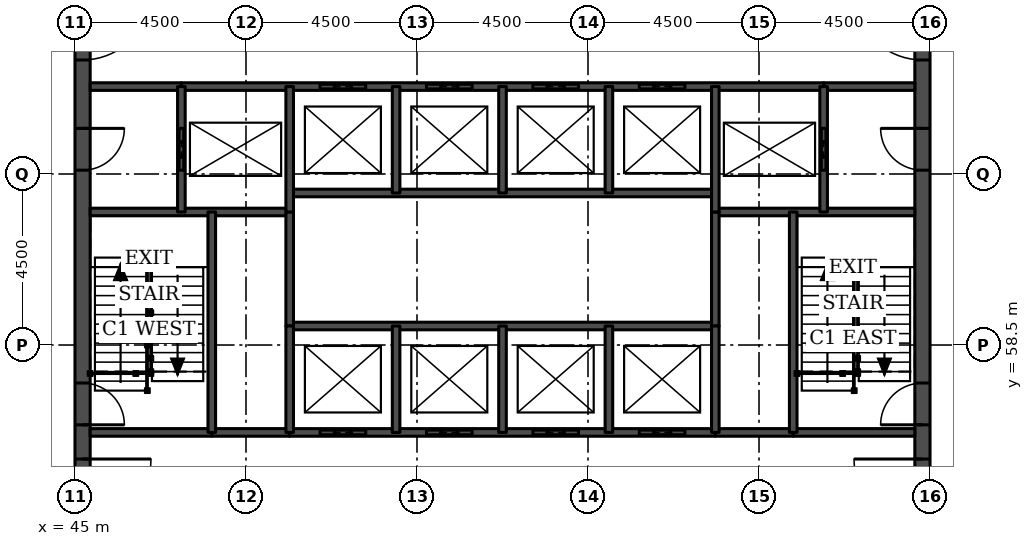
"""IFC4 building model, lengths in metres.
Left out: names, types, materials, properties, quantities, classifications, styles, units other than length and angle.
Written with IfcOpenShell. Run it as: python <this file> out.ifc"""

import sys

from ifc_helpers import new_model, si_unit, direction, frame, frame_2d, origin, place, context, subcontext, project, spatial, rectangle, extrude, element, fill, save


model = new_model("IFC4")
c1 = context("Model", 3, precision=1e-05, world=origin(), true_north=direction((0.0, 1.0)))
c2 = subcontext(c1, "Body", "Model", "MODEL_VIEW")
j1 = project(units=[si_unit("LENGTHUNIT", "METRE"), si_unit("PLANEANGLEUNIT", "RADIAN")], contexts=[c1])
p1 = place(None, origin())
s1 = spatial("IfcSite", under=j1, at=p1, CompositionType="ELEMENT")
p2 = place(p1, origin())
s2 = spatial("IfcBuilding", under=s1, at=p2, CompositionType="ELEMENT")
p3 = place(p2, frame((0.0, 0.0, 162.5)))
s3 = spatial("IfcBuildingStorey", under=s2, at=p3, CompositionType="ELEMENT", Elevation=162.5)
p4 = place(p3, frame((45.2, 49.5, 0.0), z_axis=(0.0, 0.0, 1.0), x_axis=(0.0, 1.0, 0.0)))
e1 = element("IfcWall", 1, at=p4, inside=s3, PredefinedType="SHEAR", context=c2, shape_type="SweptSolid", body=[
    extrude(rectangle(XDim=22.5, YDim=0.4, at=frame_2d((11.25, 0.0))), origin(), (0.0, 0.0, 1.0), 3.7),
])
p5 = place(p4, frame((4.2, 0.0, 0.0)))
e2 = element("IfcOpeningElement", 2, at=p5, cuts=e1, PredefinedType="OPENING", context=c2, shape_type="SweptSolid", body=[
    extrude(rectangle(XDim=1.8, YDim=2.1, at=frame_2d((0.9, 1.05))), frame((0.0, 0.21, 0.0), z_axis=(0.0, -1.0, 0.0), x_axis=(1.0, 0.0, 0.0)), (0.0, 0.0, 1.0), 0.42),
])
p6 = place(p4, frame((6.9, 0.0, 0.0)))
e3 = element("IfcOpeningElement", 3, at=p6, cuts=e1, PredefinedType="OPENING", context=c2, shape_type="SweptSolid", body=[
    extrude(rectangle(XDim=1.1, YDim=2.1, at=frame_2d((0.55, 1.05))), frame((0.0, 0.21, 0.0), z_axis=(0.0, -1.0, 0.0), x_axis=(1.0, 0.0, 0.0)), (0.0, 0.0, 1.0), 0.42),
])
p7 = place(p4, frame((13.6, 0.0, 0.0)))
e4 = element("IfcOpeningElement", 4, at=p7, cuts=e1, PredefinedType="OPENING", context=c2, shape_type="SweptSolid", body=[
    extrude(rectangle(XDim=1.1, YDim=2.1, at=frame_2d((0.55, 1.05))), frame((0.0, 0.21, 0.0), z_axis=(0.0, -1.0, 0.0), x_axis=(1.0, 0.0, 0.0)), (0.0, 0.0, 1.0), 0.42),
])
p8 = place(p4, frame((16.5, 0.0, 0.0)))
e5 = element("IfcOpeningElement", 5, at=p8, cuts=e1, PredefinedType="OPENING", context=c2, shape_type="SweptSolid", body=[
    extrude(rectangle(XDim=1.8, YDim=2.1, at=frame_2d((0.9, 1.05))), frame((0.0, 0.21, 0.0), z_axis=(0.0, -1.0, 0.0), x_axis=(1.0, 0.0, 0.0)), (0.0, 0.0, 1.0), 0.42),
])
p9 = place(p3, frame((67.3, 49.5, 0.0), z_axis=(0.0, 0.0, 1.0), x_axis=(0.0, 1.0, 0.0)))
e6 = element("IfcWall", 6, at=p9, inside=s3, PredefinedType="SHEAR", context=c2, shape_type="SweptSolid", body=[
    extrude(rectangle(XDim=22.5, YDim=0.4, at=frame_2d((11.25, 0.0))), origin(), (0.0, 0.0, 1.0), 3.7),
])
p10 = place(p9, frame((4.2, 0.0, 0.0)))
e7 = element("IfcOpeningElement", 7, at=p10, cuts=e6, PredefinedType="OPENING", context=c2, shape_type="SweptSolid", body=[
    extrude(rectangle(XDim=1.8, YDim=2.1, at=frame_2d((0.9, 1.05))), frame((0.0, 0.21, 0.0), z_axis=(0.0, -1.0, 0.0), x_axis=(1.0, 0.0, 0.0)), (0.0, 0.0, 1.0), 0.42),
])
p11 = place(p9, frame((6.9, 0.0, 0.0)))
e8 = element("IfcOpeningElement", 8, at=p11, cuts=e6, PredefinedType="OPENING", context=c2, shape_type="SweptSolid", body=[
    extrude(rectangle(XDim=1.1, YDim=2.1, at=frame_2d((0.55, 1.05))), frame((0.0, 0.21, 0.0), z_axis=(0.0, -1.0, 0.0), x_axis=(1.0, 0.0, 0.0)), (0.0, 0.0, 1.0), 0.42),
])
p12 = place(p9, frame((13.6, 0.0, 0.0)))
e9 = element("IfcOpeningElement", 9, at=p12, cuts=e6, PredefinedType="OPENING", context=c2, shape_type="SweptSolid", body=[
    extrude(rectangle(XDim=1.1, YDim=2.1, at=frame_2d((0.55, 1.05))), frame((0.0, 0.21, 0.0), z_axis=(0.0, -1.0, 0.0), x_axis=(1.0, 0.0, 0.0)), (0.0, 0.0, 1.0), 0.42),
])
p13 = place(p9, frame((16.5, 0.0, 0.0)))
e10 = element("IfcOpeningElement", 10, at=p13, cuts=e6, PredefinedType="OPENING", context=c2, shape_type="SweptSolid", body=[
    extrude(rectangle(XDim=1.8, YDim=2.1, at=frame_2d((0.9, 1.05))), frame((0.0, 0.21, 0.0), z_axis=(0.0, -1.0, 0.0), x_axis=(1.0, 0.0, 0.0)), (0.0, 0.0, 1.0), 0.42),
])
for number, where, z_axis, x_axis in (
    (11, (48.6, 56.2, 0.0), (0.0, 0.0, 1.0), (1.0, 0.0, 0.0)),
    (12, (61.85, 56.2, 0.0), (0.0, 0.0, 1.0), (1.0, 0.0, 0.0)),
):
    element("IfcWall", number, at=place(p3, frame(where, z_axis=z_axis, x_axis=x_axis)), inside=s3, PredefinedType="SOLIDWALL", context=c2, shape_type="SweptSolid", body=[
        extrude(rectangle(XDim=2.05, YDim=0.2, at=frame_2d((1.025, 0.0))), origin(), (0.0, 0.0, 1.0), 3.55),
    ])
p14 = place(p3, frame((45.4, 56.2, 0.0), z_axis=(0.0, 0.0, 1.0), x_axis=(1.0, 0.0, 0.0)))
e13 = element("IfcWall", 13, at=p14, inside=s3, PredefinedType="SOLIDWALL", context=c2, shape_type="SweptSolid", body=[
    extrude(rectangle(XDim=3.2, YDim=0.2, at=frame_2d((1.6, 0.0))), origin(), (0.0, 0.0, 1.0), 3.55),
])
p15 = place(p3, frame((50.65, 56.2, 0.0), z_axis=(0.0, 0.0, 1.0), x_axis=(1.0, 0.0, 0.0)))
e14 = element("IfcWall", 14, at=p15, inside=s3, PredefinedType="SOLIDWALL", context=c2, shape_type="SweptSolid", body=[
    extrude(rectangle(XDim=11.2, YDim=0.2, at=frame_2d((5.6, 0.0))), origin(), (0.0, 0.0, 1.0), 3.55),
])
p16 = place(p15, frame((0.8, 0.0, 0.0)))
e15 = element("IfcOpeningElement", 15, at=p16, cuts=e14, PredefinedType="OPENING", context=c2, shape_type="SweptSolid", body=[
    extrude(rectangle(XDim=1.2, YDim=2.1, at=frame_2d((0.6, 1.05))), frame((0.0, 0.11, 0.0), z_axis=(0.0, -1.0, 0.0), x_axis=(1.0, 0.0, 0.0)), (0.0, 0.0, 1.0), 0.22),
])
p17 = place(p15, frame((3.6, 0.0, 0.0)))
e16 = element("IfcOpeningElement", 16, at=p17, cuts=e14, PredefinedType="OPENING", context=c2, shape_type="SweptSolid", body=[
    extrude(rectangle(XDim=1.2, YDim=2.1, at=frame_2d((0.6, 1.05))), frame((0.0, 0.11, 0.0), z_axis=(0.0, -1.0, 0.0), x_axis=(1.0, 0.0, 0.0)), (0.0, 0.0, 1.0), 0.22),
])
p18 = place(p15, frame((6.4, 0.0, 0.0)))
e17 = element("IfcOpeningElement", 17, at=p18, cuts=e14, PredefinedType="OPENING", context=c2, shape_type="SweptSolid", body=[
    extrude(rectangle(XDim=1.2, YDim=2.1, at=frame_2d((0.6, 1.05))), frame((0.0, 0.11, 0.0), z_axis=(0.0, -1.0, 0.0), x_axis=(1.0, 0.0, 0.0)), (0.0, 0.0, 1.0), 0.22),
])
p19 = place(p15, frame((9.2, 0.0, 0.0)))
e18 = element("IfcOpeningElement", 18, at=p19, cuts=e14, PredefinedType="OPENING", context=c2, shape_type="SweptSolid", body=[
    extrude(rectangle(XDim=1.2, YDim=2.1, at=frame_2d((0.6, 1.05))), frame((0.0, 0.11, 0.0), z_axis=(0.0, -1.0, 0.0), x_axis=(1.0, 0.0, 0.0)), (0.0, 0.0, 1.0), 0.22),
])
p20 = place(p3, frame((63.9, 56.2, 0.0), z_axis=(0.0, 0.0, 1.0), x_axis=(1.0, 0.0, 0.0)))
e19 = element("IfcWall", 19, at=p20, inside=s3, PredefinedType="SOLIDWALL", context=c2, shape_type="SweptSolid", body=[
    extrude(rectangle(XDim=3.2, YDim=0.2, at=frame_2d((1.6, 0.0))), origin(), (0.0, 0.0, 1.0), 3.55),
])
p21 = place(p3, frame((50.65, 59.0, 0.0), z_axis=(0.0, 0.0, 1.0), x_axis=(1.0, 0.0, 0.0)))
e20 = element("IfcWall", 20, at=p21, inside=s3, PredefinedType="SOLIDWALL", context=c2, shape_type="SweptSolid", body=[
    extrude(rectangle(XDim=11.2, YDim=0.2, at=frame_2d((5.6, 0.0))), origin(), (0.0, 0.0, 1.0), 3.7),
])
for number, where, z_axis, x_axis in (
    (21, (45.4, 62.0, 0.0), (0.0, 0.0, 1.0), (1.0, 0.0, 0.0)),
    (22, (61.85, 62.0, 0.0), (0.0, 0.0, 1.0), (1.0, 0.0, 0.0)),
):
    element("IfcWall", number, at=place(p3, frame(where, z_axis=z_axis, x_axis=x_axis)), inside=s3, PredefinedType="SOLIDWALL", context=c2, shape_type="SweptSolid", body=[
        extrude(rectangle(XDim=5.25, YDim=0.2, at=frame_2d((2.625, 0.0))), origin(), (0.0, 0.0, 1.0), 3.55),
    ])
p22 = place(p3, frame((50.65, 62.5, 0.0), z_axis=(0.0, 0.0, 1.0), x_axis=(1.0, 0.0, 0.0)))
e23 = element("IfcWall", 23, at=p22, inside=s3, PredefinedType="SOLIDWALL", context=c2, shape_type="SweptSolid", body=[
    extrude(rectangle(XDim=11.2, YDim=0.2, at=frame_2d((5.6, 0.0))), origin(), (0.0, 0.0, 1.0), 3.7),
])
for number, where, z_axis, x_axis in (
    (24, (45.4, 65.3, 0.0), (0.0, 0.0, 1.0), (1.0, 0.0, 0.0)),
    (25, (64.7, 65.3, 0.0), (0.0, 0.0, 1.0), (1.0, 0.0, 0.0)),
):
    element("IfcWall", number, at=place(p3, frame(where, z_axis=z_axis, x_axis=x_axis)), inside=s3, PredefinedType="SOLIDWALL", context=c2, shape_type="SweptSolid", body=[
        extrude(rectangle(XDim=2.4, YDim=0.2, at=frame_2d((1.2, 0.0))), origin(), (0.0, 0.0, 1.0), 3.55),
    ])
p23 = place(p3, frame((47.8, 65.3, 0.0), z_axis=(0.0, 0.0, 1.0), x_axis=(1.0, 0.0, 0.0)))
e26 = element("IfcWall", 26, at=p23, inside=s3, PredefinedType="SOLIDWALL", context=c2, shape_type="SweptSolid", body=[
    extrude(rectangle(XDim=16.9, YDim=0.2, at=frame_2d((8.45, 0.0))), origin(), (0.0, 0.0, 1.0), 3.55),
])
p24 = place(p23, frame((3.65, 0.0, 0.0)))
e27 = element("IfcOpeningElement", 27, at=p24, cuts=e26, PredefinedType="OPENING", context=c2, shape_type="SweptSolid", body=[
    extrude(rectangle(XDim=1.2, YDim=2.1, at=frame_2d((0.6, 1.05))), frame((0.0, 0.11, 0.0), z_axis=(0.0, -1.0, 0.0), x_axis=(1.0, 0.0, 0.0)), (0.0, 0.0, 1.0), 0.22),
])
p25 = place(p23, frame((6.45, 0.0, 0.0)))
e28 = element("IfcOpeningElement", 28, at=p25, cuts=e26, PredefinedType="OPENING", context=c2, shape_type="SweptSolid", body=[
    extrude(rectangle(XDim=1.2, YDim=2.1, at=frame_2d((0.6, 1.05))), frame((0.0, 0.11, 0.0), z_axis=(0.0, -1.0, 0.0), x_axis=(1.0, 0.0, 0.0)), (0.0, 0.0, 1.0), 0.22),
])
p26 = place(p23, frame((9.25, 0.0, 0.0)))
e29 = element("IfcOpeningElement", 29, at=p26, cuts=e26, PredefinedType="OPENING", context=c2, shape_type="SweptSolid", body=[
    extrude(rectangle(XDim=1.2, YDim=2.1, at=frame_2d((0.6, 1.05))), frame((0.0, 0.11, 0.0), z_axis=(0.0, -1.0, 0.0), x_axis=(1.0, 0.0, 0.0)), (0.0, 0.0, 1.0), 0.22),
])
p27 = place(p23, frame((12.05, 0.0, 0.0)))
e30 = element("IfcOpeningElement", 30, at=p27, cuts=e26, PredefinedType="OPENING", context=c2, shape_type="SweptSolid", body=[
    extrude(rectangle(XDim=1.2, YDim=2.1, at=frame_2d((0.6, 1.05))), frame((0.0, 0.11, 0.0), z_axis=(0.0, -1.0, 0.0), x_axis=(1.0, 0.0, 0.0)), (0.0, 0.0, 1.0), 0.22),
])
p28 = place(p3, frame((47.8, 62.0, 0.0), z_axis=(0.0, 0.0, 1.0), x_axis=(0.0, 1.0, 0.0)))
e31 = element("IfcWall", 31, at=p28, inside=s3, PredefinedType="SOLIDWALL", context=c2, shape_type="SweptSolid", body=[
    extrude(rectangle(XDim=3.3, YDim=0.2, at=frame_2d((1.65, 0.0))), origin(), (0.0, 0.0, 1.0), 3.55),
])
p29 = place(p28, frame((1.1, 0.0, 0.0)))
e32 = element("IfcOpeningElement", 32, at=p29, cuts=e31, PredefinedType="OPENING", context=c2, shape_type="SweptSolid", body=[
    extrude(rectangle(XDim=1.1, YDim=2.1, at=frame_2d((0.55, 1.05))), frame((0.0, 0.11, 0.0), z_axis=(0.0, -1.0, 0.0), x_axis=(1.0, 0.0, 0.0)), (0.0, 0.0, 1.0), 0.22),
])
p30 = place(p3, frame((48.6, 56.2, 0.0), z_axis=(0.0, 0.0, 1.0), x_axis=(0.0, 1.0, 0.0)))
e33 = element("IfcWall", 33, at=p30, inside=s3, PredefinedType="SOLIDWALL", context=c2, shape_type="SweptSolid", body=[
    extrude(rectangle(XDim=5.8, YDim=0.2, at=frame_2d((2.9, 0.0))), origin(), (0.0, 0.0, 1.0), 3.55),
])
p31 = place(p3, frame((50.65, 59.0, 0.0), z_axis=(0.0, 0.0, 1.0), x_axis=(0.0, 1.0, 0.0)))
e34 = element("IfcWall", 34, at=p31, inside=s3, PredefinedType="SOLIDWALL", context=c2, shape_type="SweptSolid", body=[
    extrude(rectangle(XDim=3.0, YDim=0.2, at=frame_2d((1.5, 0.0))), origin(), (0.0, 0.0, 1.0), 3.7),
])
p32 = place(p3, frame((50.65, 56.2, 0.0), z_axis=(0.0, 0.0, 1.0), x_axis=(0.0, 1.0, 0.0)))
e35 = element("IfcWall", 35, at=p32, inside=s3, PredefinedType="SOLIDWALL", context=c2, shape_type="SweptSolid", body=[
    extrude(rectangle(XDim=2.8, YDim=0.2, at=frame_2d((1.4, 0.0))), origin(), (0.0, 0.0, 1.0), 3.55),
])
p33 = place(p3, frame((50.65, 62.0, 0.0), z_axis=(0.0, 0.0, 1.0), x_axis=(0.0, 1.0, 0.0)))
e36 = element("IfcWall", 36, at=p33, inside=s3, PredefinedType="SOLIDWALL", context=c2, shape_type="SweptSolid", body=[
    extrude(rectangle(XDim=3.3, YDim=0.2, at=frame_2d((1.65, 0.0))), origin(), (0.0, 0.0, 1.0), 3.55),
])
for number, where, z_axis, x_axis in (
    (37, (53.45, 56.2, 0.0), (0.0, 0.0, 1.0), (0.0, 1.0, 0.0)),
    (38, (53.45, 62.5, 0.0), (0.0, 0.0, 1.0), (0.0, 1.0, 0.0)),
    (39, (56.25, 56.2, 0.0), (0.0, 0.0, 1.0), (0.0, 1.0, 0.0)),
    (40, (56.25, 62.5, 0.0), (0.0, 0.0, 1.0), (0.0, 1.0, 0.0)),
    (41, (59.05, 56.2, 0.0), (0.0, 0.0, 1.0), (0.0, 1.0, 0.0)),
    (42, (59.05, 62.5, 0.0), (0.0, 0.0, 1.0), (0.0, 1.0, 0.0)),
):
    element("IfcWall", number, at=place(p3, frame(where, z_axis=z_axis, x_axis=x_axis)), inside=s3, PredefinedType="SOLIDWALL", context=c2, shape_type="SweptSolid", body=[
        extrude(rectangle(XDim=2.8, YDim=0.2, at=frame_2d((1.4, 0.0))), origin(), (0.0, 0.0, 1.0), 3.55),
    ])
p34 = place(p3, frame((61.85, 59.0, 0.0), z_axis=(0.0, 0.0, 1.0), x_axis=(0.0, 1.0, 0.0)))
e43 = element("IfcWall", 43, at=p34, inside=s3, PredefinedType="SOLIDWALL", context=c2, shape_type="SweptSolid", body=[
    extrude(rectangle(XDim=3.0, YDim=0.2, at=frame_2d((1.5, 0.0))), origin(), (0.0, 0.0, 1.0), 3.7),
])
p35 = place(p3, frame((61.85, 56.2, 0.0), z_axis=(0.0, 0.0, 1.0), x_axis=(0.0, 1.0, 0.0)))
e44 = element("IfcWall", 44, at=p35, inside=s3, PredefinedType="SOLIDWALL", context=c2, shape_type="SweptSolid", body=[
    extrude(rectangle(XDim=2.8, YDim=0.2, at=frame_2d((1.4, 0.0))), origin(), (0.0, 0.0, 1.0), 3.55),
])
p36 = place(p3, frame((61.85, 62.0, 0.0), z_axis=(0.0, 0.0, 1.0), x_axis=(0.0, 1.0, 0.0)))
e45 = element("IfcWall", 45, at=p36, inside=s3, PredefinedType="SOLIDWALL", context=c2, shape_type="SweptSolid", body=[
    extrude(rectangle(XDim=3.3, YDim=0.2, at=frame_2d((1.65, 0.0))), origin(), (0.0, 0.0, 1.0), 3.55),
])
p37 = place(p3, frame((63.9, 56.2, 0.0), z_axis=(0.0, 0.0, 1.0), x_axis=(0.0, 1.0, 0.0)))
e46 = element("IfcWall", 46, at=p37, inside=s3, PredefinedType="SOLIDWALL", context=c2, shape_type="SweptSolid", body=[
    extrude(rectangle(XDim=5.8, YDim=0.2, at=frame_2d((2.9, 0.0))), origin(), (0.0, 0.0, 1.0), 3.55),
])
p38 = place(p3, frame((64.7, 62.0, 0.0), z_axis=(0.0, 0.0, 1.0), x_axis=(0.0, 1.0, 0.0)))
e47 = element("IfcWall", 47, at=p38, inside=s3, PredefinedType="SOLIDWALL", context=c2, shape_type="SweptSolid", body=[
    extrude(rectangle(XDim=3.3, YDim=0.2, at=frame_2d((1.65, 0.0))), origin(), (0.0, 0.0, 1.0), 3.55),
])
p39 = place(p38, frame((1.1, 0.0, 0.0)))
e48 = element("IfcOpeningElement", 48, at=p39, cuts=e47, PredefinedType="OPENING", context=c2, shape_type="SweptSolid", body=[
    extrude(rectangle(XDim=1.1, YDim=2.1, at=frame_2d((0.55, 1.05))), frame((0.0, 0.11, 0.0), z_axis=(0.0, -1.0, 0.0), x_axis=(1.0, 0.0, 0.0)), (0.0, 0.0, 1.0), 0.22),
])
p40 = place(p16, origin())
e49 = element("IfcDoor", 49, at=p40, inside=s3, OperationType="DOUBLE_DOOR_SLIDING", PredefinedType="DOOR", context=c2, shape_type="SweptSolid", body=[
    extrude(rectangle(XDim=1.2, YDim=2.1, at=frame_2d((0.6, 1.05))), frame((0.0, 0.025, 0.0), z_axis=(0.0, -1.0, 0.0), x_axis=(1.0, 0.0, 0.0)), (0.0, 0.0, 1.0), 0.05),
])
fill(e15, e49)
p41 = place(p17, origin())
e50 = element("IfcDoor", 50, at=p41, inside=s3, OperationType="DOUBLE_DOOR_SLIDING", PredefinedType="DOOR", context=c2, shape_type="SweptSolid", body=[
    extrude(rectangle(XDim=1.2, YDim=2.1, at=frame_2d((0.6, 1.05))), frame((0.0, 0.025, 0.0), z_axis=(0.0, -1.0, 0.0), x_axis=(1.0, 0.0, 0.0)), (0.0, 0.0, 1.0), 0.05),
])
fill(e16, e50)
p42 = place(p18, origin())
e51 = element("IfcDoor", 51, at=p42, inside=s3, OperationType="DOUBLE_DOOR_SLIDING", PredefinedType="DOOR", context=c2, shape_type="SweptSolid", body=[
    extrude(rectangle(XDim=1.2, YDim=2.1, at=frame_2d((0.6, 1.05))), frame((0.0, 0.025, 0.0), z_axis=(0.0, -1.0, 0.0), x_axis=(1.0, 0.0, 0.0)), (0.0, 0.0, 1.0), 0.05),
])
fill(e17, e51)
p43 = place(p19, origin())
e52 = element("IfcDoor", 52, at=p43, inside=s3, OperationType="DOUBLE_DOOR_SLIDING", PredefinedType="DOOR", context=c2, shape_type="SweptSolid", body=[
    extrude(rectangle(XDim=1.2, YDim=2.1, at=frame_2d((0.6, 1.05))), frame((0.0, 0.025, 0.0), z_axis=(0.0, -1.0, 0.0), x_axis=(1.0, 0.0, 0.0)), (0.0, 0.0, 1.0), 0.05),
])
fill(e18, e52)
p44 = place(p24, origin())
e53 = element("IfcDoor", 53, at=p44, inside=s3, OperationType="DOUBLE_DOOR_SLIDING", PredefinedType="DOOR", context=c2, shape_type="SweptSolid", body=[
    extrude(rectangle(XDim=1.2, YDim=2.1, at=frame_2d((0.6, 1.05))), frame((0.0, 0.025, 0.0), z_axis=(0.0, -1.0, 0.0), x_axis=(1.0, 0.0, 0.0)), (0.0, 0.0, 1.0), 0.05),
])
fill(e27, e53)
p45 = place(p25, origin())
e54 = element("IfcDoor", 54, at=p45, inside=s3, OperationType="DOUBLE_DOOR_SLIDING", PredefinedType="DOOR", context=c2, shape_type="SweptSolid", body=[
    extrude(rectangle(XDim=1.2, YDim=2.1, at=frame_2d((0.6, 1.05))), frame((0.0, 0.025, 0.0), z_axis=(0.0, -1.0, 0.0), x_axis=(1.0, 0.0, 0.0)), (0.0, 0.0, 1.0), 0.05),
])
fill(e28, e54)
p46 = place(p26, origin())
e55 = element("IfcDoor", 55, at=p46, inside=s3, OperationType="DOUBLE_DOOR_SLIDING", PredefinedType="DOOR", context=c2, shape_type="SweptSolid", body=[
    extrude(rectangle(XDim=1.2, YDim=2.1, at=frame_2d((0.6, 1.05))), frame((0.0, 0.025, 0.0), z_axis=(0.0, -1.0, 0.0), x_axis=(1.0, 0.0, 0.0)), (0.0, 0.0, 1.0), 0.05),
])
fill(e29, e55)
p47 = place(p27, origin())
e56 = element("IfcDoor", 56, at=p47, inside=s3, OperationType="DOUBLE_DOOR_SLIDING", PredefinedType="DOOR", context=c2, shape_type="SweptSolid", body=[
    extrude(rectangle(XDim=1.2, YDim=2.1, at=frame_2d((0.6, 1.05))), frame((0.0, 0.025, 0.0), z_axis=(0.0, -1.0, 0.0), x_axis=(1.0, 0.0, 0.0)), (0.0, 0.0, 1.0), 0.05),
])
fill(e30, e56)
p48 = place(p29, origin())
e57 = element("IfcDoor", 57, at=p48, inside=s3, OperationType="DOUBLE_DOOR_SLIDING", PredefinedType="DOOR", context=c2, shape_type="SweptSolid", body=[
    extrude(rectangle(XDim=1.1, YDim=2.1, at=frame_2d((0.55, 1.05))), frame((0.0, 0.025, 0.0), z_axis=(0.0, -1.0, 0.0), x_axis=(1.0, 0.0, 0.0)), (0.0, 0.0, 1.0), 0.05),
])
fill(e32, e57)
p49 = place(p39, origin())
e58 = element("IfcDoor", 58, at=p49, inside=s3, OperationType="DOUBLE_DOOR_SLIDING", PredefinedType="DOOR", context=c2, shape_type="SweptSolid", body=[
    extrude(rectangle(XDim=1.1, YDim=2.1, at=frame_2d((0.55, 1.05))), frame((0.0, 0.025, 0.0), z_axis=(0.0, -1.0, 0.0), x_axis=(1.0, 0.0, 0.0)), (0.0, 0.0, 1.0), 0.05),
])
fill(e48, e58)
p50 = place(p5, frame((1.8, 0.0, 0.0), z_axis=(0.0, 0.0, 1.0), x_axis=(-1.0, 0.0, 0.0)))
e59 = element("IfcDoor", 59, at=p50, inside=s3, OperationType="SINGLE_SWING_LEFT", PredefinedType="DOOR", context=c2, shape_type="SweptSolid", body=[
    extrude(rectangle(XDim=1.8, YDim=2.1, at=frame_2d((0.9, 1.05))), frame((0.0, 0.025, 0.0), z_axis=(0.0, -1.0, 0.0), x_axis=(1.0, 0.0, 0.0)), (0.0, 0.0, 1.0), 0.05),
])
fill(e2, e59)
p51 = place(p6, frame((1.1, 0.0, 0.0), z_axis=(0.0, 0.0, 1.0), x_axis=(-1.0, 0.0, 0.0)))
e60 = element("IfcDoor", 60, at=p51, inside=s3, OperationType="SINGLE_SWING_RIGHT", PredefinedType="DOOR", context=c2, shape_type="SweptSolid", body=[
    extrude(rectangle(XDim=1.1, YDim=2.1, at=frame_2d((0.55, 1.05))), frame((0.0, 0.025, 0.0), z_axis=(0.0, -1.0, 0.0), x_axis=(1.0, 0.0, 0.0)), (0.0, 0.0, 1.0), 0.05),
])
fill(e3, e60)
p52 = place(p7, frame((1.1, 0.0, 0.0), z_axis=(0.0, 0.0, 1.0), x_axis=(-1.0, 0.0, 0.0)))
e61 = element("IfcDoor", 61, at=p52, inside=s3, OperationType="SINGLE_SWING_LEFT", PredefinedType="DOOR", context=c2, shape_type="SweptSolid", body=[
    extrude(rectangle(XDim=1.1, YDim=2.1, at=frame_2d((0.55, 1.05))), frame((0.0, 0.025, 0.0), z_axis=(0.0, -1.0, 0.0), x_axis=(1.0, 0.0, 0.0)), (0.0, 0.0, 1.0), 0.05),
])
fill(e4, e61)
p53 = place(p8, frame((1.8, 0.0, 0.0), z_axis=(0.0, 0.0, 1.0), x_axis=(-1.0, 0.0, 0.0)))
e62 = element("IfcDoor", 62, at=p53, inside=s3, OperationType="SINGLE_SWING_LEFT", PredefinedType="DOOR", context=c2, shape_type="SweptSolid", body=[
    extrude(rectangle(XDim=1.8, YDim=2.1, at=frame_2d((0.9, 1.05))), frame((0.0, 0.025, 0.0), z_axis=(0.0, -1.0, 0.0), x_axis=(1.0, 0.0, 0.0)), (0.0, 0.0, 1.0), 0.05),
])
fill(e5, e62)
p54 = place(p10, origin())
e63 = element("IfcDoor", 63, at=p54, inside=s3, OperationType="SINGLE_SWING_RIGHT", PredefinedType="DOOR", context=c2, shape_type="SweptSolid", body=[
    extrude(rectangle(XDim=1.8, YDim=2.1, at=frame_2d((0.9, 1.05))), frame((0.0, 0.025, 0.0), z_axis=(0.0, -1.0, 0.0), x_axis=(1.0, 0.0, 0.0)), (0.0, 0.0, 1.0), 0.05),
])
fill(e7, e63)
p55 = place(p11, origin())
e64 = element("IfcDoor", 64, at=p55, inside=s3, OperationType="SINGLE_SWING_LEFT", PredefinedType="DOOR", context=c2, shape_type="SweptSolid", body=[
    extrude(rectangle(XDim=1.1, YDim=2.1, at=frame_2d((0.55, 1.05))), frame((0.0, 0.025, 0.0), z_axis=(0.0, -1.0, 0.0), x_axis=(1.0, 0.0, 0.0)), (0.0, 0.0, 1.0), 0.05),
])
fill(e8, e64)
p56 = place(p12, origin())
e65 = element("IfcDoor", 65, at=p56, inside=s3, OperationType="SINGLE_SWING_RIGHT", PredefinedType="DOOR", context=c2, shape_type="SweptSolid", body=[
    extrude(rectangle(XDim=1.1, YDim=2.1, at=frame_2d((0.55, 1.05))), frame((0.0, 0.025, 0.0), z_axis=(0.0, -1.0, 0.0), x_axis=(1.0, 0.0, 0.0)), (0.0, 0.0, 1.0), 0.05),
])
fill(e9, e65)
p57 = place(p13, origin())
e66 = element("IfcDoor", 66, at=p57, inside=s3, OperationType="SINGLE_SWING_RIGHT", PredefinedType="DOOR", context=c2, shape_type="SweptSolid", body=[
    extrude(rectangle(XDim=1.8, YDim=2.1, at=frame_2d((0.9, 1.05))), frame((0.0, 0.025, 0.0), z_axis=(0.0, -1.0, 0.0), x_axis=(1.0, 0.0, 0.0)), (0.0, 0.0, 1.0), 0.05),
])
fill(e10, e66)
save(model, sys.argv[1])
